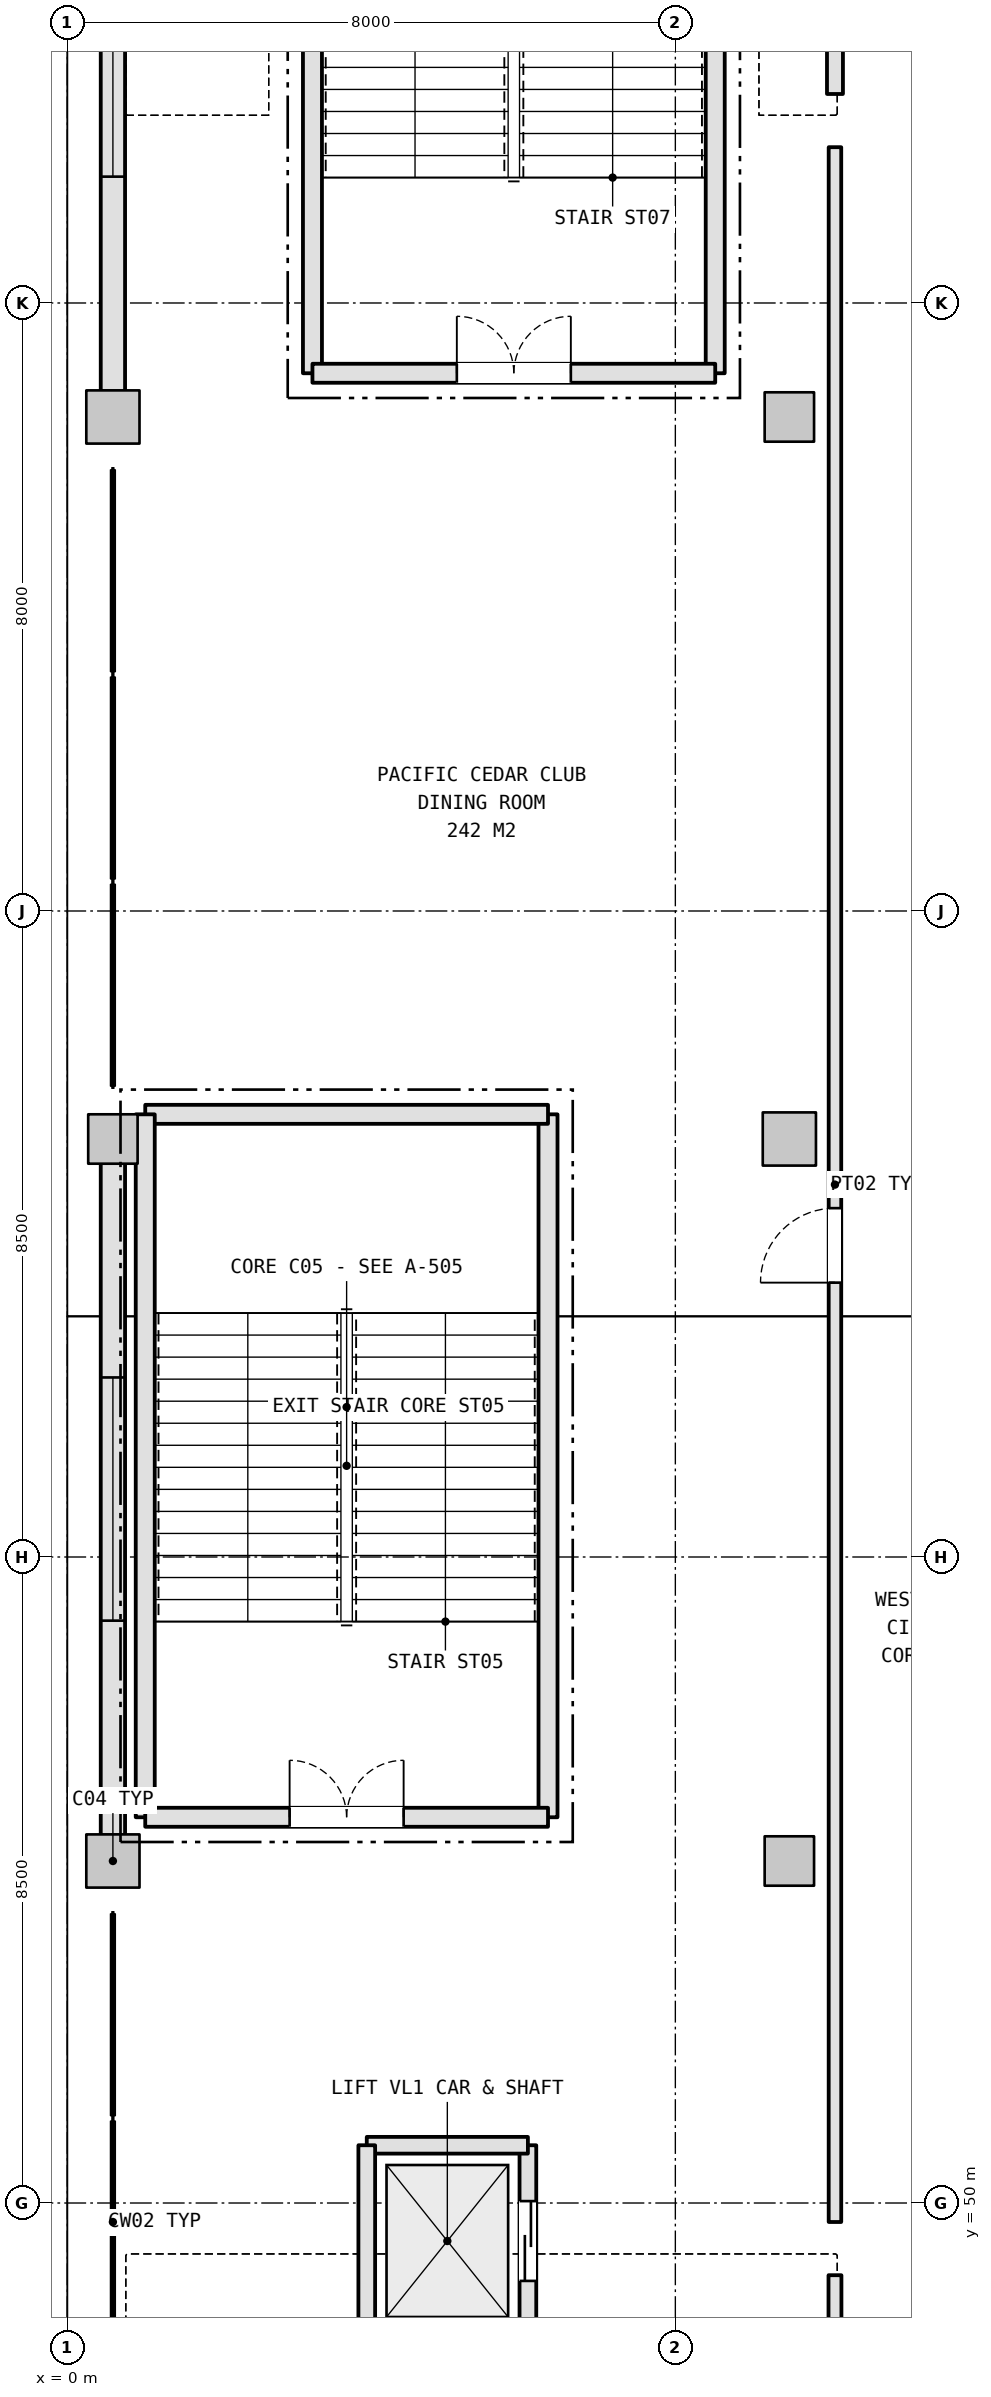
"""IFC4 building model, lengths in metres.
Left out: names, types, materials, properties, quantities, classifications, styles, units other than length and angle.
Written with IfcOpenShell. Run it as: python <this file> out.ifc"""

import sys

from ifc_helpers import new_model, si_unit, direction, frame, frame_2d, origin, origin_2d, place, context, subcontext, project, spatial, rectangle, extrude, element, fill, save


model = new_model("IFC4")
c1 = context("Model", 3, precision=1e-05, world=origin(), true_north=direction((0.0, 1.0)))
c2 = subcontext(c1, "Body", "Model", "MODEL_VIEW")
j1 = project(units=[si_unit("LENGTHUNIT", "METRE"), si_unit("PLANEANGLEUNIT", "RADIAN")], contexts=[c1])
p1 = place(None, origin())
s1 = spatial("IfcSite", under=j1, at=p1, CompositionType="ELEMENT")
p2 = place(p1, origin())
s2 = spatial("IfcBuilding", under=s1, at=p2, CompositionType="ELEMENT")
p3 = place(p2, frame((0.0, 0.0, 10.8)))
s3 = spatial("IfcBuildingStorey", under=s2, at=p3, CompositionType="ELEMENT", Elevation=10.8)
p4 = place(p3, frame((0.6, 54.5, 0.0), z_axis=(0.0, 0.0, 1.0), x_axis=(1.0, 0.0, 0.0)))
e1 = element("IfcColumn", 1, at=p4, inside=s3, PredefinedType="COLUMN", context=c2, shape_type="SweptSolid", body=[
    extrude(rectangle(XDim=0.7, YDim=0.7, at=origin_2d()), origin(), (0.0, 0.0, 1.0), 5.4),
])
p5 = place(p3, frame((0.6, 64.0, 0.0), z_axis=(0.0, 0.0, 1.0), x_axis=(1.0, 0.0, 0.0)))
e2 = element("IfcColumn", 2, at=p5, inside=s3, PredefinedType="COLUMN", context=c2, shape_type="SweptSolid", body=[
    extrude(rectangle(XDim=0.65, YDim=0.65, at=origin_2d()), origin(), (0.0, 0.0, 1.0), 5.4),
])
p6 = place(p3, frame((0.6, 73.5, 0.0), z_axis=(0.0, 0.0, 1.0), x_axis=(1.0, 0.0, 0.0)))
e3 = element("IfcColumn", 3, at=p6, inside=s3, PredefinedType="COLUMN", context=c2, shape_type="SweptSolid", body=[
    extrude(rectangle(XDim=0.7, YDim=0.7, at=origin_2d()), origin(), (0.0, 0.0, 1.0), 5.4),
])
p7 = place(p3, frame((9.5, 54.5, 0.0), z_axis=(0.0, 0.0, 1.0), x_axis=(1.0, 0.0, 0.0)))
e4 = element("IfcColumn", 4, at=p7, inside=s3, PredefinedType="COLUMN", context=c2, shape_type="SweptSolid", body=[
    extrude(rectangle(XDim=0.65, YDim=0.65, at=origin_2d()), origin(), (0.0, 0.0, 1.0), 5.4),
])
p8 = place(p3, frame((9.5, 64.0, 0.0), z_axis=(0.0, 0.0, 1.0), x_axis=(1.0, 0.0, 0.0)))
e5 = element("IfcColumn", 5, at=p8, inside=s3, PredefinedType="COLUMN", context=c2, shape_type="SweptSolid", body=[
    extrude(rectangle(XDim=0.7, YDim=0.7, at=origin_2d()), origin(), (0.0, 0.0, 1.0), 5.4),
])
p9 = place(p3, frame((9.5, 73.5, 0.0), z_axis=(0.0, 0.0, 1.0), x_axis=(1.0, 0.0, 0.0)))
e6 = element("IfcColumn", 6, at=p9, inside=s3, PredefinedType="COLUMN", context=c2, shape_type="SweptSolid", body=[
    extrude(rectangle(XDim=0.65, YDim=0.65, at=origin_2d()), origin(), (0.0, 0.0, 1.0), 5.4),
])
p10 = place(p3, frame((0.6, 54.838, 0.0), z_axis=(0.0, 0.0, 1.0), x_axis=(0.0, 1.0, 0.0)))
e7 = element("IfcWall", 7, at=p10, inside=s3, PredefinedType="SOLIDWALL", context=c2, shape_type="SweptSolid", body=[
    extrude(rectangle(XDim=8.849, YDim=0.32, at=frame_2d((4.425, 0.0))), origin(), (0.0, 0.0, 1.0), 4.485),
])
p11 = place(p10, frame((2.824, 0.0, 1.05)))
e8 = element("IfcOpeningElement", 8, at=p11, cuts=e7, PredefinedType="OPENING", context=c2, shape_type="SweptSolid", body=[
    extrude(rectangle(XDim=3.2, YDim=2.2, at=frame_2d((1.6, 1.1))), frame((0.0, 0.17, 0.0), z_axis=(0.0, -1.0, 0.0), x_axis=(1.0, 0.0, 0.0)), (0.0, 0.0, 1.0), 0.34),
])
p12 = place(p3, frame((0.6, 73.838, 0.0), z_axis=(0.0, 0.0, 1.0), x_axis=(0.0, 1.0, 0.0)))
e9 = element("IfcWall", 9, at=p12, inside=s3, PredefinedType="SOLIDWALL", context=c2, shape_type="SweptSolid", body=[
    extrude(rectangle(XDim=8.849, YDim=0.32, at=frame_2d((4.425, 0.0))), origin(), (0.0, 0.0, 1.0), 4.485),
])
p13 = place(p12, frame((2.824, 0.0, 1.05)))
e10 = element("IfcOpeningElement", 10, at=p13, cuts=e9, PredefinedType="OPENING", context=c2, shape_type="SweptSolid", body=[
    extrude(rectangle(XDim=3.2, YDim=2.2, at=frame_2d((1.6, 1.1))), frame((0.0, 0.17, 0.0), z_axis=(0.0, -1.0, 0.0), x_axis=(1.0, 0.0, 0.0)), (0.0, 0.0, 1.0), 0.34),
])
p14 = place(p3, frame((6.325, 55.075, 0.0), z_axis=(0.0, 0.0, 1.0), x_axis=(0.0, 1.0, 0.0)))
e11 = element("IfcWall", 11, at=p14, inside=s3, PredefinedType="SHEAR", context=c2, shape_type="SweptSolid", body=[
    extrude(rectangle(XDim=9.249, YDim=0.25, at=frame_2d((4.625, 0.0))), origin(), (0.0, 0.0, 1.0), 5.15),
])
p15 = place(p3, frame((6.325, 64.325, 0.0), z_axis=(0.0, 0.0, 1.0), x_axis=(-1.0, 0.0, 0.0)))
e12 = element("IfcWall", 12, at=p15, inside=s3, PredefinedType="SHEAR", context=c2, shape_type="SweptSolid", body=[
    extrude(rectangle(XDim=5.299, YDim=0.25, at=frame_2d((2.65, 0.0))), origin(), (0.0, 0.0, 1.0), 5.15),
])
p16 = place(p3, frame((1.025, 64.325, 0.0), z_axis=(0.0, 0.0, 1.0), x_axis=(0.0, -1.0, 0.0)))
e13 = element("IfcWall", 13, at=p16, inside=s3, PredefinedType="SHEAR", context=c2, shape_type="SweptSolid", body=[
    extrude(rectangle(XDim=9.249, YDim=0.25, at=frame_2d((4.625, 0.0))), origin(), (0.0, 0.0, 1.0), 5.15),
])
p17 = place(p3, frame((1.025, 55.075, 0.0), z_axis=(0.0, 0.0, 1.0), x_axis=(1.0, 0.0, 0.0)))
e14 = element("IfcWall", 14, at=p17, inside=s3, PredefinedType="SHEAR", context=c2, shape_type="SweptSolid", body=[
    extrude(rectangle(XDim=5.299, YDim=0.25, at=frame_2d((2.65, 0.0))), origin(), (0.0, 0.0, 1.0), 5.15),
])
p18 = place(p17, frame((1.9, 0.0, 0.0)))
e15 = element("IfcOpeningElement", 15, at=p18, cuts=e14, PredefinedType="OPENING", context=c2, shape_type="SweptSolid", body=[
    extrude(rectangle(XDim=1.5, YDim=2.2, at=frame_2d((0.75, 1.1))), frame((0.0, 0.135, 0.0), z_axis=(0.0, -1.0, 0.0), x_axis=(1.0, 0.0, 0.0)), (0.0, 0.0, 1.0), 0.27),
])
for number, where, z_axis, x_axis in (
    (16, (8.525, 74.075, 0.0), (0.0, 0.0, 1.0), (0.0, 1.0, 0.0)),
    (17, (3.225, 83.325, 0.0), (0.0, 0.0, 1.0), (0.0, -1.0, 0.0)),
):
    element("IfcWall", number, at=place(p3, frame(where, z_axis=z_axis, x_axis=x_axis)), inside=s3, PredefinedType="SHEAR", context=c2, shape_type="SweptSolid", body=[
        extrude(rectangle(XDim=9.249, YDim=0.25, at=frame_2d((4.625, 0.0))), origin(), (0.0, 0.0, 1.0), 5.15),
    ])
p19 = place(p3, frame((3.225, 74.075, 0.0), z_axis=(0.0, 0.0, 1.0), x_axis=(1.0, 0.0, 0.0)))
e18 = element("IfcWall", 18, at=p19, inside=s3, PredefinedType="SHEAR", context=c2, shape_type="SweptSolid", body=[
    extrude(rectangle(XDim=5.299, YDim=0.25, at=frame_2d((2.65, 0.0))), origin(), (0.0, 0.0, 1.0), 5.15),
])
p20 = place(p19, frame((1.9, 0.0, 0.0)))
e19 = element("IfcOpeningElement", 19, at=p20, cuts=e18, PredefinedType="OPENING", context=c2, shape_type="SweptSolid", body=[
    extrude(rectangle(XDim=1.5, YDim=2.2, at=frame_2d((0.75, 1.1))), frame((0.0, 0.135, 0.0), z_axis=(0.0, -1.0, 0.0), x_axis=(1.0, 0.0, 0.0)), (0.0, 0.0, 1.0), 0.27),
])
p21 = place(p3, frame((6.06, 48.24, 0.0), z_axis=(0.0, 0.0, 1.0), x_axis=(0.0, 1.0, 0.0)))
e20 = element("IfcWall", 20, at=p21, inside=s3, PredefinedType="SHEAR", context=c2, shape_type="SweptSolid", body=[
    extrude(rectangle(XDim=2.52, YDim=0.22, at=frame_2d((1.26, 0.0))), origin(), (0.0, 0.0, 1.0), 5.15),
])
p22 = place(p21, frame((0.735, 0.0, 0.0)))
e21 = element("IfcOpeningElement", 21, at=p22, cuts=e20, PredefinedType="OPENING", context=c2, shape_type="SweptSolid", body=[
    extrude(rectangle(XDim=1.05, YDim=2.15, at=frame_2d((0.525, 1.075))), frame((0.0, 0.12, 0.0), z_axis=(0.0, -1.0, 0.0), x_axis=(1.0, 0.0, 0.0)), (0.0, 0.0, 1.0), 0.24),
])
p23 = place(p3, frame((6.06, 50.76, 0.0), z_axis=(0.0, 0.0, 1.0), x_axis=(-1.0, 0.0, 0.0)))
e22 = element("IfcWall", 22, at=p23, inside=s3, PredefinedType="SHEAR", context=c2, shape_type="SweptSolid", body=[
    extrude(rectangle(XDim=2.12, YDim=0.22, at=frame_2d((1.06, 0.0))), origin(), (0.0, 0.0, 1.0), 5.15),
])
p24 = place(p3, frame((3.94, 50.76, 0.0), z_axis=(0.0, 0.0, 1.0), x_axis=(0.0, -1.0, 0.0)))
e23 = element("IfcWall", 23, at=p24, inside=s3, PredefinedType="SHEAR", context=c2, shape_type="SweptSolid", body=[
    extrude(rectangle(XDim=2.52, YDim=0.22, at=frame_2d((1.26, 0.0))), origin(), (0.0, 0.0, 1.0), 5.15),
])
p25 = place(p3, frame((10.1, 49.05, 0.0), z_axis=(0.0, 0.0, 1.0), x_axis=(0.0, -1.0, 0.0)))
e24 = element("IfcWall", 24, at=p25, inside=s3, PredefinedType="PARTITIONING", context=c2, shape_type="SweptSolid", body=[
    extrude(rectangle(XDim=29.3, YDim=0.17, at=frame_2d((14.65, 0.0))), origin(), (0.0, 0.0, 1.0), 4.678),
])
p26 = place(p25, frame((14.125, 0.0, 0.0)))
e25 = element("IfcOpeningElement", 25, at=p26, cuts=e24, PredefinedType="OPENING", context=c2, shape_type="SweptSolid", body=[
    extrude(rectangle(XDim=1.05, YDim=2.2, at=frame_2d((0.525, 1.1))), frame((0.0, 0.095, 0.0), z_axis=(0.0, -1.0, 0.0), x_axis=(1.0, 0.0, 0.0)), (0.0, 0.0, 1.0), 0.19),
])
p27 = place(p3, frame((10.1, 77.05, 0.0), z_axis=(0.0, 0.0, 1.0), x_axis=(0.0, -1.0, 0.0)))
e26 = element("IfcWall", 26, at=p27, inside=s3, PredefinedType="PARTITIONING", context=c2, shape_type="SweptSolid", body=[
    extrude(rectangle(XDim=27.3, YDim=0.165, at=frame_2d((13.65, 0.0))), origin(), (0.0, 0.0, 1.0), 4.678),
])
p28 = place(p27, frame((13.96, 0.0, 0.0)))
e27 = element("IfcOpeningElement", 27, at=p28, cuts=e26, PredefinedType="OPENING", context=c2, shape_type="SweptSolid", body=[
    extrude(rectangle(XDim=0.98, YDim=2.15, at=frame_2d((0.49, 1.075))), frame((0.0, 0.093, 0.0), z_axis=(0.0, -1.0, 0.0), x_axis=(1.0, 0.0, 0.0)), (0.0, 0.0, 1.0), 0.185),
])
p29 = place(p3, frame((10.1, 91.51, 0.0), z_axis=(0.0, 0.0, 1.0), x_axis=(0.0, -1.0, 0.0)))
e28 = element("IfcWall", 28, at=p29, inside=s3, PredefinedType="PLUMBINGWALL", context=c2, shape_type="SweptSolid", body=[
    extrude(rectangle(XDim=13.76, YDim=0.21, at=frame_2d((6.88, 0.0))), origin(), (0.0, 0.0, 1.0), 4.678),
])
p30 = place(p29, frame((6.4, 0.0, 0.0)))
e29 = element("IfcOpeningElement", 29, at=p30, cuts=e28, PredefinedType="OPENING", context=c2, shape_type="SweptSolid", body=[
    extrude(rectangle(XDim=0.96, YDim=2.15, at=frame_2d((0.48, 1.075))), frame((0.0, 0.115, 0.0), z_axis=(0.0, -1.0, 0.0), x_axis=(1.0, 0.0, 0.0)), (0.0, 0.0, 1.0), 0.23),
])
p31 = place(p11, origin())
e30 = element("IfcWindow", 30, at=p31, inside=s3, PartitioningType="SINGLE_PANEL", PredefinedType="WINDOW", context=c2, shape_type="SweptSolid", body=[
    extrude(rectangle(XDim=3.2, YDim=2.2, at=frame_2d((1.6, 1.1))), frame((0.0, 0.03, 0.0), z_axis=(0.0, -1.0, 0.0), x_axis=(1.0, 0.0, 0.0)), (0.0, 0.0, 1.0), 0.06),
])
fill(e8, e30)
p32 = place(p13, origin())
e31 = element("IfcWindow", 31, at=p32, inside=s3, PartitioningType="SINGLE_PANEL", PredefinedType="WINDOW", context=c2, shape_type="SweptSolid", body=[
    extrude(rectangle(XDim=3.2, YDim=2.2, at=frame_2d((1.6, 1.1))), frame((0.0, 0.03, 0.0), z_axis=(0.0, -1.0, 0.0), x_axis=(1.0, 0.0, 0.0)), (0.0, 0.0, 1.0), 0.06),
])
fill(e10, e31)
p33 = place(p18, origin())
e32 = element("IfcDoor", 32, at=p33, inside=s3, OperationType="DOUBLE_DOOR_SINGLE_SWING", PredefinedType="DOOR", context=c2, shape_type="SweptSolid", body=[
    extrude(rectangle(XDim=1.5, YDim=2.2, at=frame_2d((0.75, 1.1))), frame((0.0, 0.025, 0.0), z_axis=(0.0, -1.0, 0.0), x_axis=(1.0, 0.0, 0.0)), (0.0, 0.0, 1.0), 0.05),
])
fill(e15, e32)
p34 = place(p20, origin())
e33 = element("IfcDoor", 33, at=p34, inside=s3, OperationType="DOUBLE_DOOR_SINGLE_SWING", PredefinedType="DOOR", context=c2, shape_type="SweptSolid", body=[
    extrude(rectangle(XDim=1.5, YDim=2.2, at=frame_2d((0.75, 1.1))), frame((0.0, 0.025, 0.0), z_axis=(0.0, -1.0, 0.0), x_axis=(1.0, 0.0, 0.0)), (0.0, 0.0, 1.0), 0.05),
])
fill(e19, e33)
p35 = place(p22, origin())
e34 = element("IfcDoor", 34, at=p35, inside=s3, OperationType="DOUBLE_DOOR_SLIDING", PredefinedType="DOOR", context=c2, shape_type="SweptSolid", body=[
    extrude(rectangle(XDim=1.05, YDim=2.15, at=frame_2d((0.525, 1.075))), frame((0.0, 0.025, 0.0), z_axis=(0.0, -1.0, 0.0), x_axis=(1.0, 0.0, 0.0)), (0.0, 0.0, 1.0), 0.05),
])
fill(e21, e34)
p36 = place(p28, frame((0.98, 0.0, 0.0), z_axis=(0.0, 0.0, 1.0), x_axis=(-1.0, 0.0, 0.0)))
e35 = element("IfcDoor", 35, at=p36, inside=s3, OperationType="SINGLE_SWING_RIGHT", PredefinedType="DOOR", context=c2, shape_type="SweptSolid", body=[
    extrude(rectangle(XDim=0.98, YDim=2.15, at=frame_2d((0.49, 1.075))), frame((0.0, 0.025, 0.0), z_axis=(0.0, -1.0, 0.0), x_axis=(1.0, 0.0, 0.0)), (0.0, 0.0, 1.0), 0.05),
])
fill(e27, e35)
save(model, sys.argv[1])
